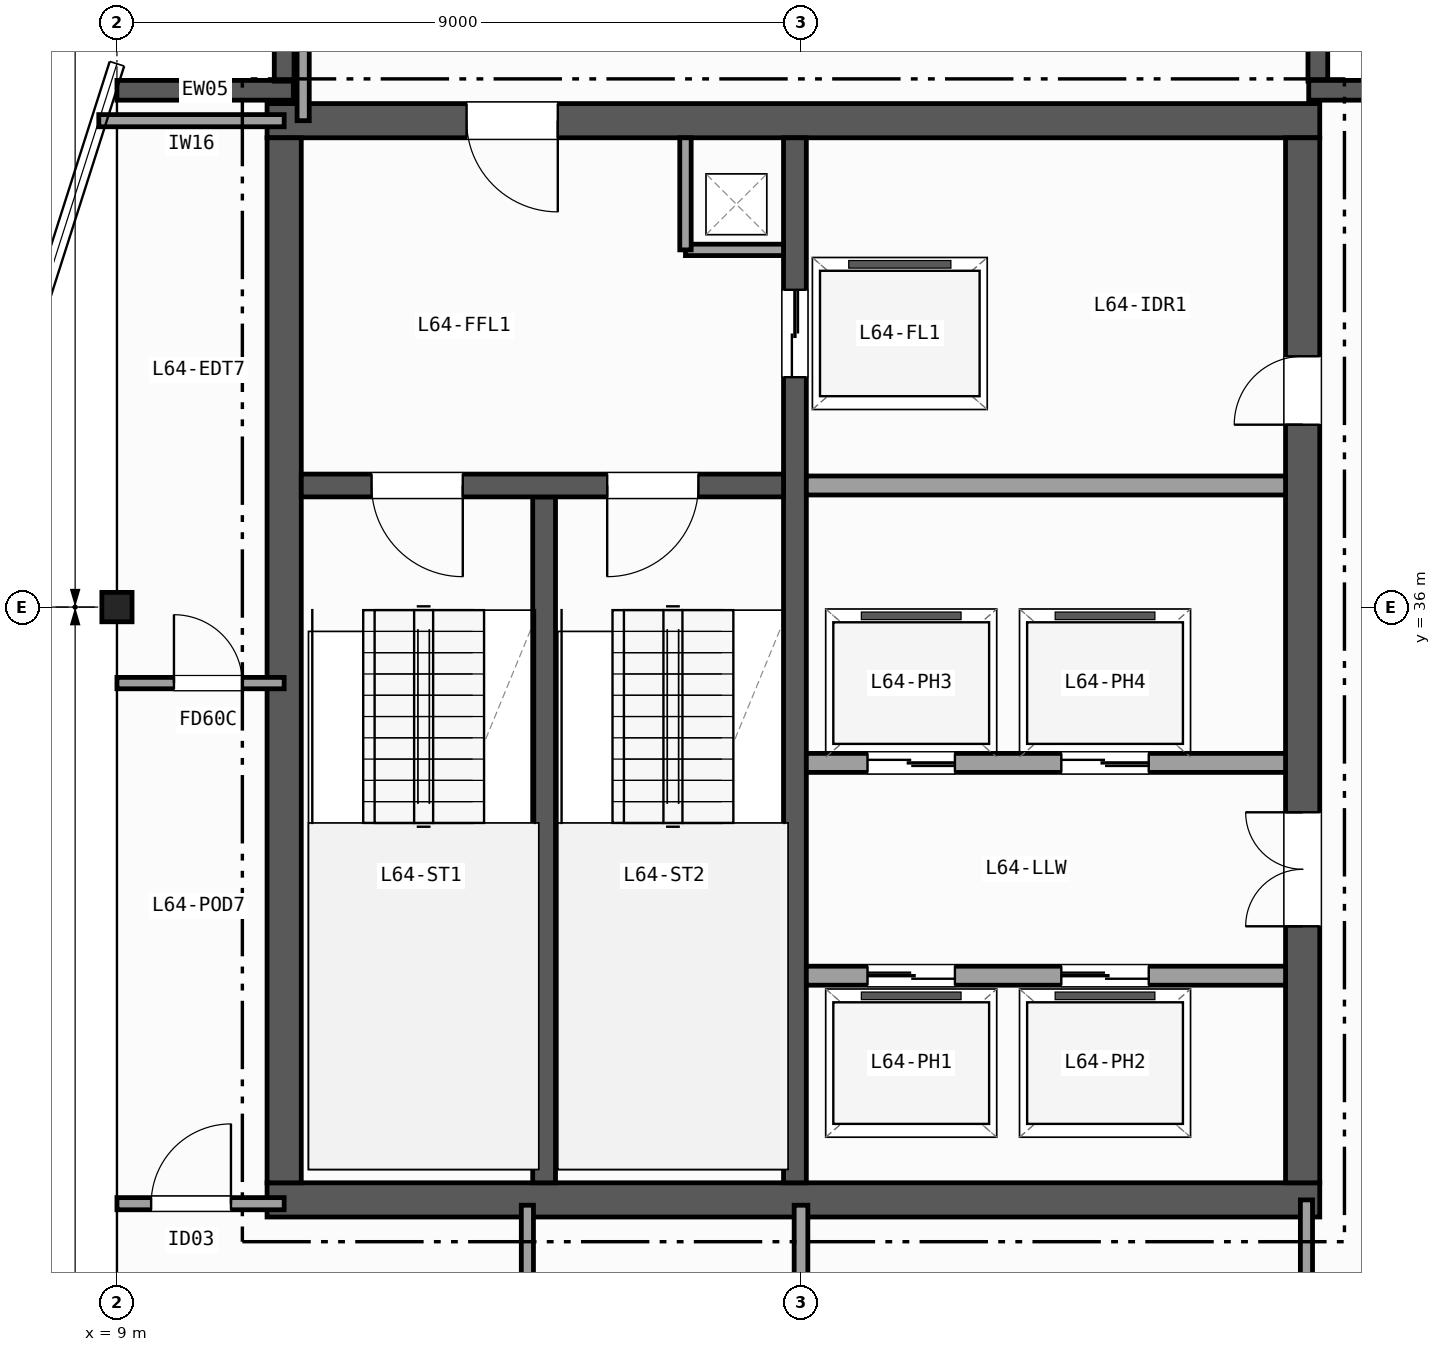
"""IFC4 building model, lengths in metres.
Left out: names, types, materials, properties, quantities, classifications, styles, units other than length and angle.
Written with IfcOpenShell. Run it as: python <this file> out.ifc"""

import sys

from ifc_helpers import new_model, si_unit, direction, frame, frame_2d, origin, origin_2d, place, context, subcontext, project, spatial, rectangle, i_section, extrude, element, fill, save


model = new_model("IFC4")
c1 = context("Model", 3, precision=1e-05, world=origin(), true_north=direction((0.0, 1.0)))
c2 = subcontext(c1, "Body", "Model", "MODEL_VIEW")
j1 = project(units=[si_unit("LENGTHUNIT", "METRE"), si_unit("PLANEANGLEUNIT", "RADIAN")], contexts=[c1])
p1 = place(None, origin())
s1 = spatial("IfcSite", under=j1, at=p1, CompositionType="ELEMENT")
p2 = place(p1, origin())
s2 = spatial("IfcBuilding", under=s1, at=p2, CompositionType="ELEMENT")
p3 = place(p2, frame((0.0, 0.0, 255.6)))
s3 = spatial("IfcBuildingStorey", under=s2, at=p3, CompositionType="ELEMENT", Elevation=255.6)
p4 = place(p3, frame((9.0, 36.0, 0.0), z_axis=(0.0, 0.0, 1.0), x_axis=(1.0, 0.0, 0.0)))
e1 = element("IfcColumn", 1, at=p4, inside=s3, PredefinedType="COLUMN", context=c2, shape_type="SweptSolid", body=[
    extrude(i_section(OverallWidth=0.397, OverallDepth=0.387, WebThickness=0.021, FlangeThickness=0.033, FilletRadius=0.015, at=origin_2d()), origin(), (0.0, 0.0, 1.0), 3.7),
])
p5 = place(p3, frame((9.0, 42.8, 0.0), z_axis=(0.0, 0.0, 1.0), x_axis=(1.0, 0.0, 0.0)))
e2 = element("IfcWall", 2, at=p5, inside=s3, PredefinedType="SOLIDWALL", context=c2, shape_type="SweptSolid", body=[
    extrude(rectangle(XDim=2.32, YDim=0.26, at=frame_2d((1.16, 0.0))), origin(), (0.0, 0.0, 1.0), 3.42),
])
for number, where, z_axis, x_axis in (
    (3, (11.2, 42.92, 0.0), (0.0, 0.0, 1.0), (0.0, 1.0, 0.0)),
    (4, (24.8, 45.0, 0.0), (0.0, 0.0, 1.0), (0.0, -1.0, 0.0)),
):
    element("IfcWall", number, at=place(p3, frame(where, z_axis=z_axis, x_axis=x_axis)), inside=s3, PredefinedType="SOLIDWALL", context=c2, shape_type="SweptSolid", body=[
        extrude(rectangle(XDim=2.08, YDim=0.26, at=frame_2d((1.04, 0.0))), origin(), (0.0, 0.0, 1.0), 3.42),
    ])
p6 = place(p3, frame((24.68, 42.8, 0.0), z_axis=(0.0, 0.0, 1.0), x_axis=(1.0, 0.0, 0.0)))
e5 = element("IfcWall", 5, at=p6, inside=s3, PredefinedType="SOLIDWALL", context=c2, shape_type="SweptSolid", body=[
    extrude(rectangle(XDim=2.32, YDim=0.26, at=frame_2d((1.16, 0.0))), origin(), (0.0, 0.0, 1.0), 3.42),
])
p7 = place(p3, frame((10.975, 28.2, 0.0), z_axis=(0.0, 0.0, 1.0), x_axis=(1.0, 0.0, 0.0)))
e6 = element("IfcWall", 6, at=p7, inside=s3, PredefinedType="SHEAR", context=c2, shape_type="SweptSolid", body=[
    extrude(rectangle(XDim=13.85, YDim=0.45, at=frame_2d((6.925, 0.0))), origin(), (0.0, 0.0, 1.0), 3.42),
])
p8 = place(p3, frame((24.825, 42.4, 0.0), z_axis=(0.0, 0.0, 1.0), x_axis=(-1.0, 0.0, 0.0)))
e7 = element("IfcWall", 7, at=p8, inside=s3, PredefinedType="SHEAR", context=c2, shape_type="SweptSolid", body=[
    extrude(rectangle(XDim=13.85, YDim=0.45, at=frame_2d((6.925, 0.0))), origin(), (0.0, 0.0, 1.0), 3.42),
])
p9 = place(p8, frame((10.025, 0.0, 0.0)))
e8 = element("IfcOpeningElement", 8, at=p9, cuts=e7, PredefinedType="OPENING", context=c2, shape_type="SweptSolid", body=[
    extrude(rectangle(XDim=1.2, YDim=2.15, at=frame_2d((0.6, 1.075))), frame((0.0, 0.235, 0.0), z_axis=(0.0, -1.0, 0.0), x_axis=(1.0, 0.0, 0.0)), (0.0, 0.0, 1.0), 0.47),
])
p10 = place(p3, frame((11.2, 42.175, 0.0), z_axis=(0.0, 0.0, 1.0), x_axis=(0.0, -1.0, 0.0)))
e9 = element("IfcWall", 9, at=p10, inside=s3, PredefinedType="SHEAR", context=c2, shape_type="SweptSolid", body=[
    extrude(rectangle(XDim=13.75, YDim=0.45, at=frame_2d((6.875, 0.0))), origin(), (0.0, 0.0, 1.0), 3.42),
])
p11 = place(p3, frame((24.6, 28.425, 0.0), z_axis=(0.0, 0.0, 1.0), x_axis=(0.0, 1.0, 0.0)))
e10 = element("IfcWall", 10, at=p11, inside=s3, PredefinedType="SHEAR", context=c2, shape_type="SweptSolid", body=[
    extrude(rectangle(XDim=13.75, YDim=0.45, at=frame_2d((6.875, 0.0))), origin(), (0.0, 0.0, 1.0), 3.42),
])
p12 = place(p11, frame((3.375, 0.0, 0.0)))
e11 = element("IfcOpeningElement", 11, at=p12, cuts=e10, PredefinedType="OPENING", context=c2, shape_type="SweptSolid", body=[
    extrude(rectangle(XDim=1.5, YDim=2.2, at=frame_2d((0.75, 1.1))), frame((0.0, 0.235, 0.0), z_axis=(0.0, -1.0, 0.0), x_axis=(1.0, 0.0, 0.0)), (0.0, 0.0, 1.0), 0.47),
])
p13 = place(p11, frame((9.975, 0.0, 0.0)))
e12 = element("IfcOpeningElement", 12, at=p13, cuts=e10, PredefinedType="OPENING", context=c2, shape_type="SweptSolid", body=[
    extrude(rectangle(XDim=0.9, YDim=2.1, at=frame_2d((0.45, 1.05))), frame((0.0, 0.235, 0.0), z_axis=(0.0, -1.0, 0.0), x_axis=(1.0, 0.0, 0.0)), (0.0, 0.0, 1.0), 0.47),
])
p14 = place(p3, frame((14.62, 28.425, 0.0), z_axis=(0.0, 0.0, 1.0), x_axis=(0.0, 1.0, 0.0)))
e13 = element("IfcWall", 13, at=p14, inside=s3, PredefinedType="SHEAR", context=c2, shape_type="SweptSolid", body=[
    extrude(rectangle(XDim=9.025, YDim=0.3, at=frame_2d((4.512, 0.0))), origin(), (0.0, 0.0, 1.0), 3.42),
])
p15 = place(p3, frame((17.92, 42.175, 0.0), z_axis=(0.0, 0.0, 1.0), x_axis=(0.0, -1.0, 0.0)))
e14 = element("IfcWall", 14, at=p15, inside=s3, PredefinedType="SHEAR", context=c2, shape_type="SweptSolid", body=[
    extrude(rectangle(XDim=13.75, YDim=0.3, at=frame_2d((6.875, 0.0))), origin(), (0.0, 0.0, 1.0), 3.42),
])
p16 = place(p15, frame((2.0, 0.0, 0.0)))
e15 = element("IfcOpeningElement", 15, at=p16, cuts=e14, PredefinedType="OPENING", context=c2, shape_type="SweptSolid", body=[
    extrude(rectangle(XDim=1.15, YDim=2.15, at=frame_2d((0.575, 1.075))), frame((0.0, 0.16, 0.0), z_axis=(0.0, -1.0, 0.0), x_axis=(1.0, 0.0, 0.0)), (0.0, 0.0, 1.0), 0.32),
])
p17 = place(p3, frame((17.77, 37.6, 0.0), z_axis=(0.0, 0.0, 1.0), x_axis=(-1.0, 0.0, 0.0)))
e16 = element("IfcWall", 16, at=p17, inside=s3, PredefinedType="SHEAR", context=c2, shape_type="SweptSolid", body=[
    extrude(rectangle(XDim=6.345, YDim=0.3, at=frame_2d((3.172, 0.0))), origin(), (0.0, 0.0, 1.0), 3.42),
])
p18 = place(p17, frame((4.22, 0.0, 0.0)))
e17 = element("IfcOpeningElement", 17, at=p18, cuts=e16, PredefinedType="OPENING", context=c2, shape_type="SweptSolid", body=[
    extrude(rectangle(XDim=1.2, YDim=2.15, at=frame_2d((0.6, 1.075))), frame((0.0, 0.16, 0.0), z_axis=(0.0, -1.0, 0.0), x_axis=(1.0, 0.0, 0.0)), (0.0, 0.0, 1.0), 0.32),
])
p19 = place(p17, frame((1.12, 0.0, 0.0)))
e18 = element("IfcOpeningElement", 18, at=p19, cuts=e16, PredefinedType="OPENING", context=c2, shape_type="SweptSolid", body=[
    extrude(rectangle(XDim=1.2, YDim=2.15, at=frame_2d((0.6, 1.075))), frame((0.0, 0.16, 0.0), z_axis=(0.0, -1.0, 0.0), x_axis=(1.0, 0.0, 0.0)), (0.0, 0.0, 1.0), 0.32),
])
p20 = place(p3, frame((16.48, 40.7, 0.0), z_axis=(0.0, 0.0, 1.0), x_axis=(1.0, 0.0, 0.0)))
e19 = element("IfcWall", 19, at=p20, inside=s3, PredefinedType="PARTITIONING", context=c2, shape_type="SweptSolid", body=[
    extrude(rectangle(XDim=1.29, YDim=0.15, at=frame_2d((0.645, 0.0))), origin(), (0.0, 0.0, 1.0), 3.42),
])
p21 = place(p3, frame((16.48, 40.7, 0.0), z_axis=(0.0, 0.0, 1.0), x_axis=(0.0, 1.0, 0.0)))
e20 = element("IfcWall", 20, at=p21, inside=s3, PredefinedType="PARTITIONING", context=c2, shape_type="SweptSolid", body=[
    extrude(rectangle(XDim=1.475, YDim=0.15, at=frame_2d((0.738, 0.0))), origin(), (0.0, 0.0, 1.0), 3.42),
])
p22 = place(p3, frame((18.07, 37.6, 0.0), z_axis=(0.0, 0.0, 1.0), x_axis=(1.0, 0.0, 0.0)))
e21 = element("IfcWall", 21, at=p22, inside=s3, PredefinedType="PARTITIONING", context=c2, shape_type="SweptSolid", body=[
    extrude(rectangle(XDim=6.305, YDim=0.25, at=frame_2d((3.152, 0.0))), origin(), (0.0, 0.0, 1.0), 3.42),
])
p23 = place(p3, frame((18.07, 31.15, 0.0), z_axis=(0.0, 0.0, 1.0), x_axis=(1.0, 0.0, 0.0)))
e22 = element("IfcWall", 22, at=p23, inside=s3, PredefinedType="PARTITIONING", context=c2, shape_type="SweptSolid", body=[
    extrude(rectangle(XDim=6.305, YDim=0.25, at=frame_2d((3.152, 0.0))), origin(), (0.0, 0.0, 1.0), 3.42),
])
p24 = place(p23, frame((0.805, 0.0, 0.0)))
e23 = element("IfcOpeningElement", 23, at=p24, cuts=e22, PredefinedType="OPENING", context=c2, shape_type="SweptSolid", body=[
    extrude(rectangle(XDim=1.15, YDim=2.15, at=frame_2d((0.575, 1.075))), frame((0.0, 0.135, 0.0), z_axis=(0.0, -1.0, 0.0), x_axis=(1.0, 0.0, 0.0)), (0.0, 0.0, 1.0), 0.27),
])
p25 = place(p23, frame((3.355, 0.0, 0.0)))
e24 = element("IfcOpeningElement", 24, at=p25, cuts=e22, PredefinedType="OPENING", context=c2, shape_type="SweptSolid", body=[
    extrude(rectangle(XDim=1.15, YDim=2.15, at=frame_2d((0.575, 1.075))), frame((0.0, 0.135, 0.0), z_axis=(0.0, -1.0, 0.0), x_axis=(1.0, 0.0, 0.0)), (0.0, 0.0, 1.0), 0.27),
])
p26 = place(p3, frame((24.375, 33.95, 0.0), z_axis=(0.0, 0.0, 1.0), x_axis=(-1.0, 0.0, 0.0)))
e25 = element("IfcWall", 25, at=p26, inside=s3, PredefinedType="PARTITIONING", context=c2, shape_type="SweptSolid", body=[
    extrude(rectangle(XDim=6.305, YDim=0.25, at=frame_2d((3.152, 0.0))), origin(), (0.0, 0.0, 1.0), 3.42),
])
p27 = place(p26, frame((4.35, 0.0, 0.0)))
e26 = element("IfcOpeningElement", 26, at=p27, cuts=e25, PredefinedType="OPENING", context=c2, shape_type="SweptSolid", body=[
    extrude(rectangle(XDim=1.15, YDim=2.15, at=frame_2d((0.575, 1.075))), frame((0.0, 0.135, 0.0), z_axis=(0.0, -1.0, 0.0), x_axis=(1.0, 0.0, 0.0)), (0.0, 0.0, 1.0), 0.27),
])
p28 = place(p26, frame((1.8, 0.0, 0.0)))
e27 = element("IfcOpeningElement", 27, at=p28, cuts=e25, PredefinedType="OPENING", context=c2, shape_type="SweptSolid", body=[
    extrude(rectangle(XDim=1.15, YDim=2.15, at=frame_2d((0.575, 1.075))), frame((0.0, 0.135, 0.0), z_axis=(0.0, -1.0, 0.0), x_axis=(1.0, 0.0, 0.0)), (0.0, 0.0, 1.0), 0.27),
])
p29 = place(p3, frame((9.0, 28.15, 0.0), z_axis=(0.0, 0.0, 1.0), x_axis=(1.0, 0.0, 0.0)))
e28 = element("IfcWall", 28, at=p29, inside=s3, PredefinedType="PARTITIONING", context=c2, shape_type="SweptSolid", body=[
    extrude(rectangle(XDim=2.2, YDim=0.16, at=frame_2d((1.1, 0.0))), origin(), (0.0, 0.0, 1.0), 2.707),
])
p30 = place(p29, frame((0.45, 0.0, 0.0)))
e29 = element("IfcOpeningElement", 29, at=p30, cuts=e28, PredefinedType="OPENING", context=c2, shape_type="SweptSolid", body=[
    extrude(rectangle(XDim=1.05, YDim=2.15, at=frame_2d((0.525, 1.075))), frame((0.0, 0.09, 0.0), z_axis=(0.0, -1.0, 0.0), x_axis=(1.0, 0.0, 0.0)), (0.0, 0.0, 1.0), 0.18),
])
p31 = place(p3, frame((8.761, 42.4, 0.0), z_axis=(0.0, 0.0, 1.0), x_axis=(1.0, 0.0, 0.0)))
e30 = element("IfcWall", 30, at=p31, inside=s3, PredefinedType="PARTITIONING", context=c2, shape_type="SweptSolid", body=[
    extrude(rectangle(XDim=2.439, YDim=0.16, at=frame_2d((1.219, 0.0))), origin(), (0.0, 0.0, 1.0), 3.42),
])
p32 = place(p3, frame((11.45, 42.4, 0.0), z_axis=(0.0, 0.0, 1.0), x_axis=(0.0, 1.0, 0.0)))
e31 = element("IfcWall", 31, at=p32, inside=s3, PredefinedType="PARTITIONING", context=c2, shape_type="SweptSolid", body=[
    extrude(rectangle(XDim=2.666, YDim=0.16, at=frame_2d((1.333, 0.0))), origin(), (0.0, 0.0, 1.0), 3.42),
])
p33 = place(p3, frame((9.0, 35.0, 0.0), z_axis=(0.0, 0.0, 1.0), x_axis=(1.0, 0.0, 0.0)))
e32 = element("IfcWall", 32, at=p33, inside=s3, PredefinedType="PARTITIONING", context=c2, shape_type="SweptSolid", body=[
    extrude(rectangle(XDim=2.2, YDim=0.15, at=frame_2d((1.1, 0.0))), origin(), (0.0, 0.0, 1.0), 2.707),
])
p34 = place(p33, frame((0.75, 0.0, 0.0)))
e33 = element("IfcOpeningElement", 33, at=p34, cuts=e32, PredefinedType="OPENING", context=c2, shape_type="SweptSolid", body=[
    extrude(rectangle(XDim=0.9, YDim=2.1, at=frame_2d((0.45, 1.05))), frame((0.0, 0.085, 0.0), z_axis=(0.0, -1.0, 0.0), x_axis=(1.0, 0.0, 0.0)), (0.0, 0.0, 1.0), 0.17),
])
p35 = place(p3, frame((24.65, 9.0, 0.0), z_axis=(0.0, 0.0, 1.0), x_axis=(0.0, 1.0, 0.0)))
e34 = element("IfcWall", 34, at=p35, inside=s3, PredefinedType="PARTITIONING", context=c2, shape_type="SweptSolid", body=[
    extrude(rectangle(XDim=19.2, YDim=0.16, at=frame_2d((9.6, 0.0))), origin(), (0.0, 0.0, 1.0), 2.707),
])
p36 = place(p35, frame((7.0, 0.0, 0.0)))
e35 = element("IfcOpeningElement", 35, at=p36, cuts=e34, PredefinedType="OPENING", context=c2, shape_type="SweptSolid", body=[
    extrude(rectangle(XDim=0.86, YDim=2.05, at=frame_2d((0.43, 1.025))), frame((0.0, 0.09, 0.0), z_axis=(0.0, -1.0, 0.0), x_axis=(1.0, 0.0, 0.0)), (0.0, 0.0, 1.0), 0.18),
])
p37 = place(p35, frame((2.55, 0.0, 0.0)))
e36 = element("IfcOpeningElement", 36, at=p37, cuts=e34, PredefinedType="OPENING", context=c2, shape_type="SweptSolid", body=[
    extrude(rectangle(XDim=0.95, YDim=2.1, at=frame_2d((0.475, 1.05))), frame((0.0, 0.09, 0.0), z_axis=(0.0, -1.0, 0.0), x_axis=(1.0, 0.0, 0.0)), (0.0, 0.0, 1.0), 0.18),
])
p38 = place(p3, frame((18.0, 14.2, 0.0), z_axis=(0.0, 0.0, 1.0), x_axis=(0.0, 1.0, 0.0)))
e37 = element("IfcWall", 37, at=p38, inside=s3, PredefinedType="PARTITIONING", context=c2, shape_type="SweptSolid", body=[
    extrude(rectangle(XDim=13.93, YDim=0.18, at=frame_2d((6.965, 0.0))), origin(), (0.0, 0.0, 1.0), 2.789),
])
p39 = place(p38, frame((7.3, 0.0, 0.0)))
e38 = element("IfcOpeningElement", 38, at=p39, cuts=e37, PredefinedType="OPENING", context=c2, shape_type="SweptSolid", body=[
    extrude(rectangle(XDim=1.0, YDim=2.1, at=frame_2d((0.5, 1.05))), frame((0.0, 0.1, 0.0), z_axis=(0.0, -1.0, 0.0), x_axis=(1.0, 0.0, 0.0)), (0.0, 0.0, 1.0), 0.2),
])
p40 = place(p3, frame((14.4, 18.0, 0.0), z_axis=(0.0, 0.0, 1.0), x_axis=(0.0, 1.0, 0.0)))
e39 = element("IfcWall", 39, at=p40, inside=s3, PredefinedType="PARTITIONING", context=c2, shape_type="SweptSolid", body=[
    extrude(rectangle(XDim=10.13, YDim=0.16, at=frame_2d((5.065, 0.0))), origin(), (0.0, 0.0, 1.0), 2.789),
])
p41 = place(p40, frame((2.5, 0.0, 0.0)))
e40 = element("IfcOpeningElement", 40, at=p41, cuts=e39, PredefinedType="OPENING", context=c2, shape_type="SweptSolid", body=[
    extrude(rectangle(XDim=1.05, YDim=2.15, at=frame_2d((0.525, 1.075))), frame((0.0, 0.09, 0.0), z_axis=(0.0, -1.0, 0.0), x_axis=(1.0, 0.0, 0.0)), (0.0, 0.0, 1.0), 0.18),
])
p42 = place(p18, origin())
e41 = element("IfcDoor", 41, at=p42, inside=s3, OperationType="SINGLE_SWING_LEFT", PredefinedType="DOOR", context=c2, shape_type="SweptSolid", body=[
    extrude(rectangle(XDim=1.2, YDim=2.15, at=frame_2d((0.6, 1.075))), frame((0.0, 0.025, 0.0), z_axis=(0.0, -1.0, 0.0), x_axis=(1.0, 0.0, 0.0)), (0.0, 0.0, 1.0), 0.05),
])
fill(e17, e41)
p43 = place(p19, origin())
e42 = element("IfcDoor", 42, at=p43, inside=s3, OperationType="SINGLE_SWING_RIGHT", PredefinedType="DOOR", context=c2, shape_type="SweptSolid", body=[
    extrude(rectangle(XDim=1.2, YDim=2.15, at=frame_2d((0.6, 1.075))), frame((0.0, 0.025, 0.0), z_axis=(0.0, -1.0, 0.0), x_axis=(1.0, 0.0, 0.0)), (0.0, 0.0, 1.0), 0.05),
])
fill(e18, e42)
p44 = place(p12, origin())
e43 = element("IfcDoor", 43, at=p44, inside=s3, OperationType="DOUBLE_DOOR_SINGLE_SWING", PredefinedType="DOOR", context=c2, shape_type="SweptSolid", body=[
    extrude(rectangle(XDim=1.5, YDim=2.2, at=frame_2d((0.75, 1.1))), frame((0.0, 0.025, 0.0), z_axis=(0.0, -1.0, 0.0), x_axis=(1.0, 0.0, 0.0)), (0.0, 0.0, 1.0), 0.05),
])
fill(e11, e43)
p45 = place(p9, origin())
e44 = element("IfcDoor", 44, at=p45, inside=s3, OperationType="SINGLE_SWING_LEFT", PredefinedType="DOOR", context=c2, shape_type="SweptSolid", body=[
    extrude(rectangle(XDim=1.2, YDim=2.15, at=frame_2d((0.6, 1.075))), frame((0.0, 0.025, 0.0), z_axis=(0.0, -1.0, 0.0), x_axis=(1.0, 0.0, 0.0)), (0.0, 0.0, 1.0), 0.05),
])
fill(e8, e44)
p46 = place(p13, origin())
e45 = element("IfcDoor", 45, at=p46, inside=s3, OperationType="SINGLE_SWING_LEFT", PredefinedType="DOOR", context=c2, shape_type="SweptSolid", body=[
    extrude(rectangle(XDim=0.9, YDim=2.1, at=frame_2d((0.45, 1.05))), frame((0.0, 0.025, 0.0), z_axis=(0.0, -1.0, 0.0), x_axis=(1.0, 0.0, 0.0)), (0.0, 0.0, 1.0), 0.05),
])
fill(e12, e45)
p47 = place(p16, origin())
e46 = element("IfcDoor", 46, at=p47, inside=s3, OperationType="DOUBLE_DOOR_SLIDING", PredefinedType="DOOR", context=c2, shape_type="SweptSolid", body=[
    extrude(rectangle(XDim=1.15, YDim=2.15, at=frame_2d((0.575, 1.075))), frame((0.0, 0.025, 0.0), z_axis=(0.0, -1.0, 0.0), x_axis=(1.0, 0.0, 0.0)), (0.0, 0.0, 1.0), 0.05),
])
fill(e15, e46)
p48 = place(p24, origin())
e47 = element("IfcDoor", 47, at=p48, inside=s3, OperationType="DOUBLE_DOOR_SLIDING", PredefinedType="DOOR", context=c2, shape_type="SweptSolid", body=[
    extrude(rectangle(XDim=1.15, YDim=2.15, at=frame_2d((0.575, 1.075))), frame((0.0, 0.025, 0.0), z_axis=(0.0, -1.0, 0.0), x_axis=(1.0, 0.0, 0.0)), (0.0, 0.0, 1.0), 0.05),
])
fill(e23, e47)
p49 = place(p25, origin())
e48 = element("IfcDoor", 48, at=p49, inside=s3, OperationType="DOUBLE_DOOR_SLIDING", PredefinedType="DOOR", context=c2, shape_type="SweptSolid", body=[
    extrude(rectangle(XDim=1.15, YDim=2.15, at=frame_2d((0.575, 1.075))), frame((0.0, 0.025, 0.0), z_axis=(0.0, -1.0, 0.0), x_axis=(1.0, 0.0, 0.0)), (0.0, 0.0, 1.0), 0.05),
])
fill(e24, e48)
p50 = place(p27, origin())
e49 = element("IfcDoor", 49, at=p50, inside=s3, OperationType="DOUBLE_DOOR_SLIDING", PredefinedType="DOOR", context=c2, shape_type="SweptSolid", body=[
    extrude(rectangle(XDim=1.15, YDim=2.15, at=frame_2d((0.575, 1.075))), frame((0.0, 0.025, 0.0), z_axis=(0.0, -1.0, 0.0), x_axis=(1.0, 0.0, 0.0)), (0.0, 0.0, 1.0), 0.05),
])
fill(e26, e49)
p51 = place(p28, origin())
e50 = element("IfcDoor", 50, at=p51, inside=s3, OperationType="DOUBLE_DOOR_SLIDING", PredefinedType="DOOR", context=c2, shape_type="SweptSolid", body=[
    extrude(rectangle(XDim=1.15, YDim=2.15, at=frame_2d((0.575, 1.075))), frame((0.0, 0.025, 0.0), z_axis=(0.0, -1.0, 0.0), x_axis=(1.0, 0.0, 0.0)), (0.0, 0.0, 1.0), 0.05),
])
fill(e27, e50)
p52 = place(p30, origin())
e51 = element("IfcDoor", 51, at=p52, inside=s3, OperationType="SINGLE_SWING_RIGHT", PredefinedType="DOOR", context=c2, shape_type="SweptSolid", body=[
    extrude(rectangle(XDim=1.05, YDim=2.15, at=frame_2d((0.525, 1.075))), frame((0.0, 0.025, 0.0), z_axis=(0.0, -1.0, 0.0), x_axis=(1.0, 0.0, 0.0)), (0.0, 0.0, 1.0), 0.05),
])
fill(e29, e51)
p53 = place(p34, origin())
e52 = element("IfcDoor", 52, at=p53, inside=s3, OperationType="SINGLE_SWING_LEFT", PredefinedType="DOOR", context=c2, shape_type="SweptSolid", body=[
    extrude(rectangle(XDim=0.9, YDim=2.1, at=frame_2d((0.45, 1.05))), frame((0.0, 0.025, 0.0), z_axis=(0.0, -1.0, 0.0), x_axis=(1.0, 0.0, 0.0)), (0.0, 0.0, 1.0), 0.05),
])
fill(e33, e52)
save(model, sys.argv[1])
